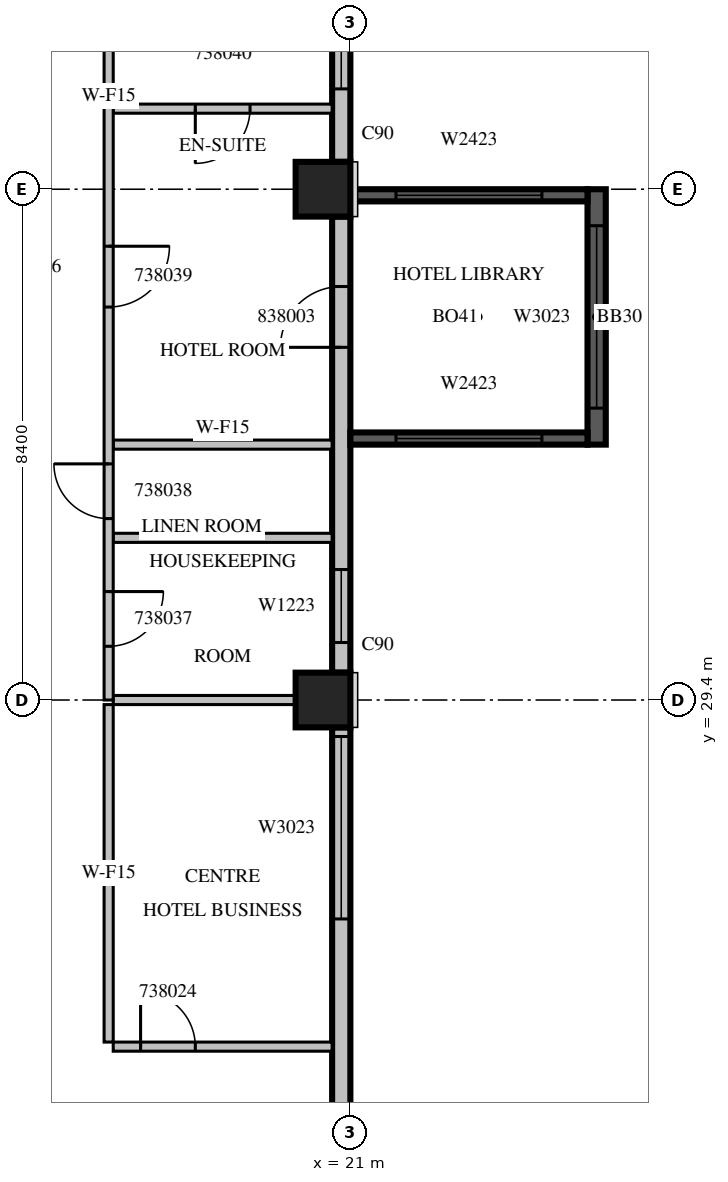
"""IFC4 building model, lengths in metres.
Left out: names, types, materials, properties, quantities, classifications, styles, units other than length and angle.
Written with IfcOpenShell. Run it as: python <this file> out.ifc"""

import sys

from ifc_helpers import new_model, si_unit, direction, frame, frame_2d, origin, origin_2d, place, context, subcontext, project, spatial, rectangle, extrude, source, transform, mapped, element, fill, save


model = new_model("IFC4")
c1 = context("Model", 3, precision=1e-05, world=origin(), true_north=direction((0.0, 1.0)))
c2 = subcontext(c1, "Body", "Model", "MODEL_VIEW")
j1 = project(units=[si_unit("LENGTHUNIT", "METRE"), si_unit("PLANEANGLEUNIT", "RADIAN")], contexts=[c1])
p1 = place(None, origin())
s1 = spatial("IfcSite", under=j1, at=p1, CompositionType="ELEMENT")
p2 = place(p1, origin())
s2 = spatial("IfcBuilding", under=s1, at=p2, CompositionType="ELEMENT")
p3 = place(p2, frame((0.0, 0.0, 177.8)))
s3 = spatial("IfcBuildingStorey", under=s2, at=p3, CompositionType="ELEMENT", Elevation=177.8)
m1 = source(origin(), c2, "Body", "SweptSolid", [
    extrude(rectangle(XDim=0.9, YDim=0.9, at=origin_2d()), origin(), (0.0, 0.0, 1.0), 3.8),
])
for number, where, z_axis, x_axis in (
    (1, (20.55, 29.4, 0.0), (0.0, 0.0, 1.0), (1.0, 0.0, 0.0)),
    (2, (20.55, 37.8, 0.0), (0.0, 0.0, 1.0), (1.0, 0.0, 0.0)),
):
    element("IfcColumn", number, at=place(p3, frame(where, z_axis=z_axis, x_axis=x_axis)), inside=s3, PredefinedType="COLUMN", context=c2, shape_type="MappedRepresentation", body=[
        mapped(m1, transform((0.0, 0.0, 0.0), scale=1.0)),
    ])
m2 = source(origin(), c2, "Body", "SweptSolid", [
    extrude(rectangle(XDim=7.15, YDim=0.3, at=frame_2d((3.575, 0.0))), origin(), (0.0, 0.0, 1.0), 3.4),
])
p4 = place(p3, frame((20.85, 21.8, 0.0), z_axis=(0.0, 0.0, 1.0), x_axis=(0.0, 1.0, 0.0)))
e3 = element("IfcWall", 3, at=p4, inside=s3, PredefinedType="STANDARD", context=c2, shape_type="MappedRepresentation", body=[
    mapped(m2, transform((0.0, 0.0, 0.0), scale=1.0)),
])
m3 = source(origin(), c2, "Body", "SweptSolid", [
    extrude(rectangle(XDim=3.0, YDim=2.3, at=frame_2d((1.5, 1.15))), frame((0.0, 0.16, 0.0), z_axis=(0.0, -1.0, 0.0), x_axis=(1.0, 0.0, 0.0)), (0.0, 0.0, 1.0), 0.32),
])
p5 = place(p4, frame((4.0, 0.0, 0.6)))
e4 = element("IfcOpeningElement", 4, at=p5, cuts=e3, PredefinedType="OPENING", context=c2, shape_type="MappedRepresentation", body=[
    mapped(m3, transform((0.0, 0.0, 0.0), scale=1.0)),
])
m4 = source(origin(), c2, "Body", "SweptSolid", [
    extrude(rectangle(XDim=7.5, YDim=0.3, at=frame_2d((3.75, 0.0))), origin(), (0.0, 0.0, 1.0), 3.4),
])
p6 = place(p3, frame((20.85, 29.85, 0.0), z_axis=(0.0, 0.0, 1.0), x_axis=(0.0, 1.0, 0.0)))
e5 = element("IfcWall", 5, at=p6, inside=s3, PredefinedType="STANDARD", context=c2, shape_type="MappedRepresentation", body=[
    mapped(m4, transform((0.0, 0.0, 0.0), scale=1.0)),
])
m5 = source(origin(), c2, "Body", "SweptSolid", [
    extrude(rectangle(XDim=1.2, YDim=2.3, at=frame_2d((0.6, 1.15))), frame((0.0, 0.16, 0.0), z_axis=(0.0, -1.0, 0.0), x_axis=(1.0, 0.0, 0.0)), (0.0, 0.0, 1.0), 0.32),
])
p7 = place(p6, frame((0.496, 0.0, 0.6)))
e6 = element("IfcOpeningElement", 6, at=p7, cuts=e5, PredefinedType="OPENING", context=c2, shape_type="MappedRepresentation", body=[
    mapped(m5, transform((0.0, 0.0, 0.0), scale=1.0)),
])
m6 = source(origin(), c2, "Body", "SweptSolid", [
    extrude(rectangle(XDim=1.0, YDim=2.1, at=frame_2d((0.5, 1.05))), frame((0.0, 0.16, 0.0), z_axis=(0.0, -1.0, 0.0), x_axis=(1.0, 0.0, 0.0)), (0.0, 0.0, 1.0), 0.32),
])
p8 = place(p6, frame((5.35, 0.0, 0.0)))
e7 = element("IfcOpeningElement", 7, at=p8, cuts=e5, PredefinedType="OPENING", context=c2, shape_type="MappedRepresentation", body=[
    mapped(m6, transform((0.0, 0.0, 0.0), scale=1.0)),
])
p9 = place(p3, frame((20.85, 38.25, 0.0), z_axis=(0.0, 0.0, 1.0), x_axis=(0.0, 1.0, 0.0)))
e8 = element("IfcWall", 8, at=p9, inside=s3, PredefinedType="STANDARD", context=c2, shape_type="SweptSolid", body=[
    extrude(rectangle(XDim=3.75, YDim=0.3, at=frame_2d((1.875, 0.0))), origin(), (0.0, 0.0, 1.0), 3.4),
])
m7 = source(origin(), c2, "Body", "SweptSolid", [
    extrude(rectangle(XDim=1.8, YDim=2.3, at=frame_2d((0.9, 1.15))), frame((0.0, 0.16, 0.0), z_axis=(0.0, -1.0, 0.0), x_axis=(1.0, 0.0, 0.0)), (0.0, 0.0, 1.0), 0.32),
])
p10 = place(p9, frame((1.2, 0.0, 0.6)))
e9 = element("IfcOpeningElement", 9, at=p10, cuts=e8, PredefinedType="OPENING", context=c2, shape_type="MappedRepresentation", body=[
    mapped(m7, transform((0.0, 0.0, 0.0), scale=1.0)),
])
m8 = source(origin(), c2, "Body", "SweptSolid", [
    extrude(rectangle(XDim=4.2, YDim=0.3, at=frame_2d((2.1, 0.0))), origin(), (0.0, 0.0, 1.0), 3.39),
])
p11 = place(p3, frame((25.05, 33.6, 0.0), z_axis=(0.0, 0.0, 1.0), x_axis=(0.0, 1.0, 0.0)))
e10 = element("IfcWall", 10, at=p11, inside=s3, PredefinedType="SOLIDWALL", context=c2, shape_type="MappedRepresentation", body=[
    mapped(m8, transform((0.0, 0.0, 0.0), scale=1.0)),
])
p12 = place(p11, frame((0.6, 0.0, 0.6)))
e11 = element("IfcOpeningElement", 11, at=p12, cuts=e10, PredefinedType="OPENING", context=c2, shape_type="MappedRepresentation", body=[
    mapped(m3, transform((0.0, 0.0, 0.0), scale=1.0)),
])
m9 = source(origin(), c2, "Body", "SweptSolid", [
    extrude(rectangle(XDim=3.9, YDim=0.2, at=frame_2d((1.95, 0.0))), origin(), (0.0, 0.0, 1.0), 3.39),
])
p13 = place(p3, frame((21.0, 33.7, 0.0), z_axis=(0.0, 0.0, 1.0), x_axis=(1.0, 0.0, 0.0)))
e12 = element("IfcWall", 12, at=p13, inside=s3, PredefinedType="SOLIDWALL", context=c2, shape_type="MappedRepresentation", body=[
    mapped(m9, transform((0.0, 0.0, 0.0), scale=1.0)),
])
m10 = source(origin(), c2, "Body", "SweptSolid", [
    extrude(rectangle(XDim=2.4, YDim=2.3, at=frame_2d((1.2, 1.15))), frame((0.0, 0.11, 0.0), z_axis=(0.0, -1.0, 0.0), x_axis=(1.0, 0.0, 0.0)), (0.0, 0.0, 1.0), 0.22),
])
p14 = place(p13, frame((0.75, 0.0, 0.6)))
e13 = element("IfcOpeningElement", 13, at=p14, cuts=e12, PredefinedType="OPENING", context=c2, shape_type="MappedRepresentation", body=[
    mapped(m10, transform((0.0, 0.0, 0.0), scale=1.0)),
])
p15 = place(p3, frame((21.0, 37.7, 0.0), z_axis=(0.0, 0.0, 1.0), x_axis=(1.0, 0.0, 0.0)))
e14 = element("IfcWall", 14, at=p15, inside=s3, PredefinedType="SOLIDWALL", context=c2, shape_type="MappedRepresentation", body=[
    mapped(m9, transform((0.0, 0.0, 0.0), scale=1.0)),
])
p16 = place(p15, frame((0.75, 0.0, 0.6)))
e15 = element("IfcOpeningElement", 15, at=p16, cuts=e14, PredefinedType="OPENING", context=c2, shape_type="MappedRepresentation", body=[
    mapped(m10, transform((0.0, 0.0, 0.0), scale=1.0)),
])
m11 = source(origin(), c2, "Body", "SweptSolid", [
    extrude(rectangle(XDim=3.6, YDim=0.15, at=frame_2d((1.8, 0.0))), origin(), (0.0, 0.0, 1.0), 3.4),
])
p17 = place(p3, frame((17.1, 23.7, 0.0), z_axis=(0.0, 0.0, 1.0), x_axis=(1.0, 0.0, 0.0)))
e16 = element("IfcWall", 16, at=p17, inside=s3, PredefinedType="PARTITIONING", context=c2, shape_type="MappedRepresentation", body=[
    mapped(m11, transform((0.0, 0.0, 0.0), scale=1.0)),
])
m12 = source(origin(), c2, "Body", "SweptSolid", [
    extrude(rectangle(XDim=0.9, YDim=2.1, at=frame_2d((0.45, 1.05))), frame((0.0, 0.085, 0.0), z_axis=(0.0, -1.0, 0.0), x_axis=(1.0, 0.0, 0.0)), (0.0, 0.0, 1.0), 0.17),
])
p18 = place(p17, frame((0.45, 0.0, 0.0)))
e17 = element("IfcOpeningElement", 17, at=p18, cuts=e16, PredefinedType="OPENING", context=c2, shape_type="MappedRepresentation", body=[
    mapped(m12, transform((0.0, 0.0, 0.0), scale=1.0)),
])
m13 = source(origin(), c2, "Body", "SweptSolid", [
    extrude(rectangle(XDim=5.55, YDim=0.15, at=frame_2d((2.775, 0.0))), origin(), (0.0, 0.0, 1.0), 3.4),
])
p19 = place(p3, frame((17.025, 29.325, 0.0), z_axis=(0.0, 0.0, 1.0), x_axis=(0.0, -1.0, 0.0)))
e18 = element("IfcWall", 18, at=p19, inside=s3, PredefinedType="PARTITIONING", context=c2, shape_type="MappedRepresentation", body=[
    mapped(m13, transform((0.0, 0.0, 0.0), scale=1.0)),
])
m14 = source(origin(), c2, "Body", "SweptSolid", [
    extrude(rectangle(XDim=3.001, YDim=0.15, at=frame_2d((1.5, 0.0))), origin(), (0.0, 0.0, 1.0), 3.4),
])
p20 = place(p3, frame((20.101, 29.4, 0.0), z_axis=(0.0, 0.0, 1.0), x_axis=(-1.0, 0.0, 0.0)))
e19 = element("IfcWall", 19, at=p20, inside=s3, PredefinedType="PARTITIONING", context=c2, shape_type="MappedRepresentation", body=[
    mapped(m14, transform((0.0, 0.0, 0.0), scale=1.0)),
])
p21 = place(p3, frame((17.1, 32.067, 0.0), z_axis=(0.0, 0.0, 1.0), x_axis=(1.0, 0.0, 0.0)))
e20 = element("IfcWall", 20, at=p21, inside=s3, PredefinedType="PARTITIONING", context=c2, shape_type="MappedRepresentation", body=[
    mapped(m11, transform((0.0, 0.0, 0.0), scale=1.0)),
])
p22 = place(p3, frame((17.1, 39.125, 0.0), z_axis=(0.0, 0.0, 1.0), x_axis=(1.0, 0.0, 0.0)))
e21 = element("IfcWall", 21, at=p22, inside=s3, PredefinedType="PARTITIONING", context=c2, shape_type="MappedRepresentation", body=[
    mapped(m11, transform((0.0, 0.0, 0.0), scale=1.0)),
])
p23 = place(p22, frame((1.35, 0.0, 0.0)))
e22 = element("IfcOpeningElement", 22, at=p23, cuts=e21, PredefinedType="OPENING", context=c2, shape_type="MappedRepresentation", body=[
    mapped(m12, transform((0.0, 0.0, 0.0), scale=1.0)),
])
p24 = place(p3, frame((20.7, 33.6, 0.0), z_axis=(0.0, 0.0, 1.0), x_axis=(-1.0, 0.0, 0.0)))
e23 = element("IfcWall", 23, at=p24, inside=s3, PredefinedType="PARTITIONING", context=c2, shape_type="MappedRepresentation", body=[
    mapped(m11, transform((0.0, 0.0, 0.0), scale=1.0)),
])
p25 = place(p3, frame((17.025, 49.26, 0.0), z_axis=(0.0, 0.0, 1.0), x_axis=(0.0, -1.0, 0.0)))
e24 = element("IfcWall", 24, at=p25, inside=s3, PredefinedType="PARTITIONING", context=c2, shape_type="SweptSolid", body=[
    extrude(rectangle(XDim=19.86, YDim=0.15, at=frame_2d((9.93, 0.0))), origin(), (0.0, 0.0, 1.0), 3.4),
])
p26 = place(p25, frame((18.076, 0.0, 0.0)))
e25 = element("IfcOpeningElement", 25, at=p26, cuts=e24, PredefinedType="OPENING", context=c2, shape_type="MappedRepresentation", body=[
    mapped(m12, transform((0.0, 0.0, 0.0), scale=1.0)),
])
p27 = place(p25, frame((15.976, 0.0, 0.0)))
e26 = element("IfcOpeningElement", 26, at=p27, cuts=e24, PredefinedType="OPENING", context=c2, shape_type="MappedRepresentation", body=[
    mapped(m12, transform((0.0, 0.0, 0.0), scale=1.0)),
])
m15 = source(origin(), c2, "Body", "SweptSolid", [
    extrude(rectangle(XDim=1.0, YDim=2.1, at=frame_2d((0.5, 1.05))), frame((0.0, 0.085, 0.0), z_axis=(0.0, -1.0, 0.0), x_axis=(1.0, 0.0, 0.0)), (0.0, 0.0, 1.0), 0.17),
])
p28 = place(p25, frame((12.398, 0.0, 0.0)))
e27 = element("IfcOpeningElement", 27, at=p28, cuts=e24, PredefinedType="OPENING", context=c2, shape_type="MappedRepresentation", body=[
    mapped(m15, transform((0.0, 0.0, 0.0), scale=1.0)),
])
p29 = place(p25, frame((3.143, 0.0, 0.0)))
e28 = element("IfcOpeningElement", 28, at=p29, cuts=e24, PredefinedType="OPENING", context=c2, shape_type="MappedRepresentation", body=[
    mapped(m12, transform((0.0, 0.0, 0.0), scale=1.0)),
])
m16 = source(origin(), c2, "Body", "SweptSolid", [
    extrude(rectangle(XDim=3.0, YDim=2.3, at=frame_2d((1.5, 1.15))), frame((0.0, 0.03, 0.0), z_axis=(0.0, -1.0, 0.0), x_axis=(1.0, 0.0, 0.0)), (0.0, 0.0, 1.0), 0.06),
])
p30 = place(p5, origin())
e29 = element("IfcWindow", 29, at=p30, inside=s3, PartitioningType="SINGLE_PANEL", PredefinedType="WINDOW", context=c2, shape_type="MappedRepresentation", body=[
    mapped(m16, transform((0.0, 0.0, 0.0), scale=1.0)),
])
fill(e4, e29)
m17 = source(origin(), c2, "Body", "SweptSolid", [
    extrude(rectangle(XDim=1.2, YDim=2.3, at=frame_2d((0.6, 1.15))), frame((0.0, 0.03, 0.0), z_axis=(0.0, -1.0, 0.0), x_axis=(1.0, 0.0, 0.0)), (0.0, 0.0, 1.0), 0.06),
])
p31 = place(p7, origin())
e30 = element("IfcWindow", 30, at=p31, inside=s3, PartitioningType="SINGLE_PANEL", PredefinedType="WINDOW", context=c2, shape_type="MappedRepresentation", body=[
    mapped(m17, transform((0.0, 0.0, 0.0), scale=1.0)),
])
fill(e6, e30)
m18 = source(origin(), c2, "Body", "SweptSolid", [
    extrude(rectangle(XDim=1.8, YDim=2.3, at=frame_2d((0.9, 1.15))), frame((0.0, 0.03, 0.0), z_axis=(0.0, -1.0, 0.0), x_axis=(1.0, 0.0, 0.0)), (0.0, 0.0, 1.0), 0.06),
])
p32 = place(p10, origin())
e31 = element("IfcWindow", 31, at=p32, inside=s3, PartitioningType="SINGLE_PANEL", PredefinedType="WINDOW", context=c2, shape_type="MappedRepresentation", body=[
    mapped(m18, transform((0.0, 0.0, 0.0), scale=1.0)),
])
fill(e9, e31)
p33 = place(p12, origin())
e32 = element("IfcWindow", 32, at=p33, inside=s3, PartitioningType="SINGLE_PANEL", PredefinedType="WINDOW", context=c2, shape_type="MappedRepresentation", body=[
    mapped(m16, transform((0.0, 0.0, 0.0), scale=1.0)),
])
fill(e11, e32)
m19 = source(origin(), c2, "Body", "SweptSolid", [
    extrude(rectangle(XDim=2.4, YDim=2.3, at=frame_2d((1.2, 1.15))), frame((0.0, 0.03, 0.0), z_axis=(0.0, -1.0, 0.0), x_axis=(1.0, 0.0, 0.0)), (0.0, 0.0, 1.0), 0.06),
])
p34 = place(p14, origin())
e33 = element("IfcWindow", 33, at=p34, inside=s3, PartitioningType="SINGLE_PANEL", PredefinedType="WINDOW", context=c2, shape_type="MappedRepresentation", body=[
    mapped(m19, transform((0.0, 0.0, 0.0), scale=1.0)),
])
fill(e13, e33)
p35 = place(p16, origin())
e34 = element("IfcWindow", 34, at=p35, inside=s3, PartitioningType="SINGLE_PANEL", PredefinedType="WINDOW", context=c2, shape_type="MappedRepresentation", body=[
    mapped(m19, transform((0.0, 0.0, 0.0), scale=1.0)),
])
fill(e15, e34)
m20 = source(origin(), c2, "Body", "SweptSolid", [
    extrude(rectangle(XDim=0.9, YDim=2.1, at=frame_2d((0.45, 1.05))), frame((0.0, 0.025, 0.0), z_axis=(0.0, -1.0, 0.0), x_axis=(1.0, 0.0, 0.0)), (0.0, 0.0, 1.0), 0.05),
])
p36 = place(p18, origin())
e35 = element("IfcDoor", 35, at=p36, inside=s3, OperationType="SINGLE_SWING_LEFT", PredefinedType="DOOR", context=c2, shape_type="MappedRepresentation", body=[
    mapped(m20, transform((0.0, 0.0, 0.0), scale=1.0)),
])
fill(e17, e35)
p37 = place(p26, origin())
e36 = element("IfcDoor", 36, at=p37, inside=s3, OperationType="SINGLE_SWING_LEFT", PredefinedType="DOOR", context=c2, shape_type="MappedRepresentation", body=[
    mapped(m20, transform((0.0, 0.0, 0.0), scale=1.0)),
])
fill(e25, e36)
p38 = place(p27, origin())
e37 = element("IfcDoor", 37, at=p38, inside=s3, OperationType="SINGLE_SWING_RIGHT", PredefinedType="DOOR", context=c2, shape_type="MappedRepresentation", body=[
    mapped(m20, transform((0.0, 0.0, 0.0), scale=1.0)),
])
fill(e26, e37)
m21 = source(origin(), c2, "Body", "SweptSolid", [
    extrude(rectangle(XDim=1.0, YDim=2.1, at=frame_2d((0.5, 1.05))), frame((0.0, 0.025, 0.0), z_axis=(0.0, -1.0, 0.0), x_axis=(1.0, 0.0, 0.0)), (0.0, 0.0, 1.0), 0.05),
])
p39 = place(p28, origin())
e38 = element("IfcDoor", 38, at=p39, inside=s3, OperationType="SINGLE_SWING_LEFT", PredefinedType="DOOR", context=c2, shape_type="MappedRepresentation", body=[
    mapped(m21, transform((0.0, 0.0, 0.0), scale=1.0)),
])
fill(e27, e38)
p40 = place(p23, origin())
e39 = element("IfcDoor", 39, at=p40, inside=s3, OperationType="SINGLE_SWING_RIGHT", PredefinedType="DOOR", context=c2, shape_type="MappedRepresentation", body=[
    mapped(m20, transform((0.0, 0.0, 0.0), scale=1.0)),
])
fill(e22, e39)
p41 = place(p8, origin())
e40 = element("IfcDoor", 40, at=p41, inside=s3, OperationType="SINGLE_SWING_LEFT", PredefinedType="DOOR", context=c2, shape_type="MappedRepresentation", body=[
    mapped(m21, transform((0.0, 0.0, 0.0), scale=1.0)),
])
fill(e7, e40)
save(model, sys.argv[1])
